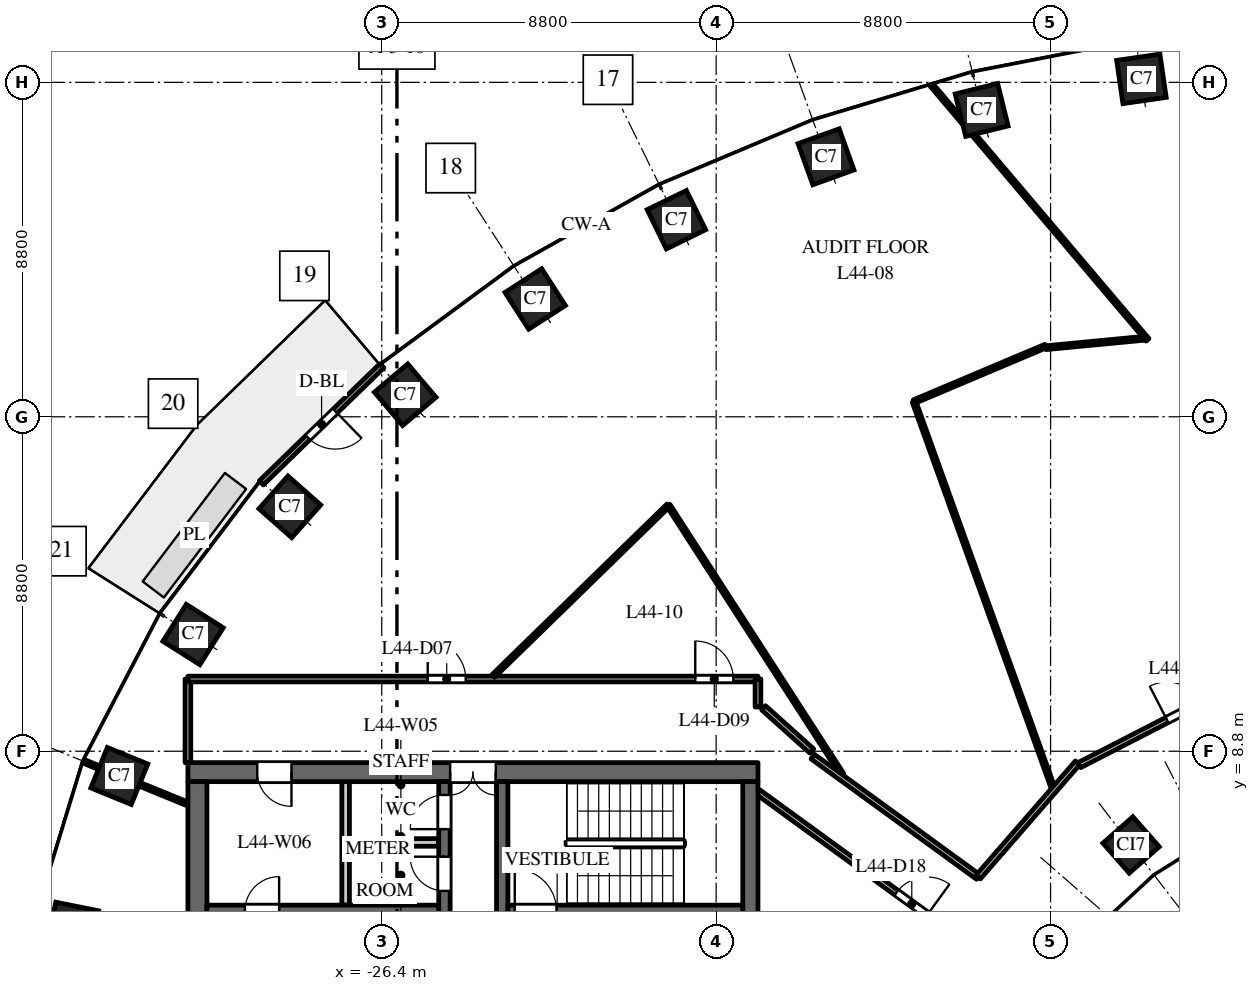
"""IFC4 building model, lengths in metres.
Left out: names, types, materials, properties, quantities, classifications, styles, units other than length and angle.
Written with IfcOpenShell. Run it as: python <this file> out.ifc"""

import sys

from ifc_helpers import new_model, si_unit, direction, frame, frame_2d, origin, origin_2d, place, context, subcontext, project, spatial, rectangle, extrude, element, fill, save


model = new_model("IFC4")
c1 = context("Model", 3, precision=1e-05, world=origin(), true_north=direction((0.0, 1.0)))
c2 = subcontext(c1, "Body", "Model", "MODEL_VIEW")
j1 = project(units=[si_unit("LENGTHUNIT", "METRE"), si_unit("PLANEANGLEUNIT", "RADIAN")], contexts=[c1])
p1 = place(None, origin())
s1 = spatial("IfcSite", under=j1, at=p1, CompositionType="ELEMENT")
p2 = place(p1, origin())
s2 = spatial("IfcBuilding", under=s1, at=p2, CompositionType="ELEMENT")
p3 = place(p2, frame((0.0, 0.0, 190.0)))
s3 = spatial("IfcBuildingStorey", under=s2, at=p3, CompositionType="ELEMENT", Elevation=190.0)
for number, where, z_axis, x_axis in (
    (1, (-6.409, 26.491, 0.0), (0.0, 0.0, 1.0), (-0.99, -0.143, 0.0)),
    (2, (-10.613, 25.674, 0.0), (0.0, 0.0, 1.0), (-0.971, -0.24, 0.0)),
    (3, (-14.709, 24.441, 0.0), (0.0, 0.0, 1.0), (-0.941, -0.338, 0.0)),
    (4, (-18.646, 22.785, 0.0), (0.0, 0.0, 1.0), (-0.898, -0.439, 0.0)),
    (5, (-22.362, 20.7, 0.0), (0.0, 0.0, 1.0), (-0.84, -0.542, 0.0)),
    (6, (-25.783, 18.18, 0.0), (0.0, 0.0, 1.0), (-0.763, -0.646, 0.0)),
    (7, (-28.819, 15.23, 0.0), (0.0, 0.0, 1.0), (-0.663, -0.749, 0.0)),
    (8, (-31.365, 11.871, 0.0), (0.0, 0.0, 1.0), (-0.535, -0.845, 0.0)),
    (9, (-33.305, 8.149, 0.0), (0.0, 0.0, 1.0), (-0.379, -0.925, 0.0)),
    (10, (-34.527, 4.151, 0.0), (0.0, 0.0, 1.0), (-0.197, -0.98, 0.0)),
):
    element("IfcColumn", number, at=place(p3, frame(where, z_axis=z_axis, x_axis=x_axis)), inside=s3, PredefinedType="COLUMN", context=c2, shape_type="SweptSolid", body=[
        extrude(rectangle(XDim=1.15, YDim=1.15, at=origin_2d()), origin(), (0.0, 0.0, 1.0), 4.0),
    ])
p4 = place(p3, frame((-6.682, 6.334, 0.0), z_axis=(0.0, 0.0, 1.0), x_axis=(-0.75102249095, -0.660276622399, 0.0)))
e11 = element("IfcColumn", 11, at=p4, inside=s3, PredefinedType="COLUMN", context=c2, shape_type="SweptSolid", body=[
    extrude(rectangle(XDim=1.05, YDim=1.05, at=origin_2d()), origin(), (0.0, 0.0, 1.0), 4.0),
])
p5 = place(p3, frame((-16.5, 8.25, 0.0), z_axis=(0.0, 0.0, 1.0), x_axis=(-1.0, 0.0, 0.0)))
e12 = element("IfcWall", 12, at=p5, inside=s3, PredefinedType="SHEAR", context=c2, shape_type="SweptSolid", body=[
    extrude(rectangle(XDim=15.0, YDim=0.5, at=frame_2d((7.5, 0.0))), origin(), (0.0, 0.0, 1.0), 3.7),
])
p6 = place(p5, frame((6.9, 0.0, 0.0)))
e13 = element("IfcOpeningElement", 13, at=p6, cuts=e12, PredefinedType="OPENING", context=c2, shape_type="SweptSolid", body=[
    extrude(rectangle(XDim=1.2, YDim=2.1, at=frame_2d((0.6, 1.05))), frame((0.0, 0.26, 0.0), z_axis=(0.0, -1.0, 0.0), x_axis=(1.0, 0.0, 0.0)), (0.0, 0.0, 1.0), 0.52),
])
p7 = place(p5, frame((12.275, 0.0, 0.0)))
e14 = element("IfcOpeningElement", 14, at=p7, cuts=e12, PredefinedType="OPENING", context=c2, shape_type="SweptSolid", body=[
    extrude(rectangle(XDim=0.9, YDim=2.1, at=frame_2d((0.45, 1.05))), frame((0.0, 0.26, 0.0), z_axis=(0.0, -1.0, 0.0), x_axis=(1.0, 0.0, 0.0)), (0.0, 0.0, 1.0), 0.52),
])
p8 = place(p3, frame((-24.75, -8.0, 0.0), z_axis=(0.0, 0.0, 1.0), x_axis=(0.0, 1.0, 0.0)))
e15 = element("IfcWall", 15, at=p8, inside=s3, PredefinedType="SHEAR", context=c2, shape_type="SweptSolid", body=[
    extrude(rectangle(XDim=16.0, YDim=0.3, at=frame_2d((8.0, 0.0))), origin(), (0.0, 0.0, 1.0), 3.7),
])
p9 = place(p8, frame((4.425, 0.0, 0.0)))
e16 = element("IfcOpeningElement", 16, at=p9, cuts=e15, PredefinedType="OPENING", context=c2, shape_type="SweptSolid", body=[
    extrude(rectangle(XDim=1.1, YDim=2.1, at=frame_2d((0.55, 1.05))), frame((0.0, 0.16, 0.0), z_axis=(0.0, -1.0, 0.0), x_axis=(1.0, 0.0, 0.0)), (0.0, 0.0, 1.0), 0.32),
])
p10 = place(p8, frame((7.45, 0.0, 0.0)))
e17 = element("IfcOpeningElement", 17, at=p10, cuts=e15, PredefinedType="OPENING", context=c2, shape_type="SweptSolid", body=[
    extrude(rectangle(XDim=1.1, YDim=2.1, at=frame_2d((0.55, 1.05))), frame((0.0, 0.16, 0.0), z_axis=(0.0, -1.0, 0.0), x_axis=(1.0, 0.0, 0.0)), (0.0, 0.0, 1.0), 0.32),
])
p11 = place(p8, frame((10.475, 0.0, 0.0)))
e18 = element("IfcOpeningElement", 18, at=p11, cuts=e15, PredefinedType="OPENING", context=c2, shape_type="SweptSolid", body=[
    extrude(rectangle(XDim=1.1, YDim=2.1, at=frame_2d((0.55, 1.05))), frame((0.0, 0.16, 0.0), z_axis=(0.0, -1.0, 0.0), x_axis=(1.0, 0.0, 0.0)), (0.0, 0.0, 1.0), 0.32),
])
p12 = place(p8, frame((13.125, 0.0, 0.0)))
e19 = element("IfcOpeningElement", 19, at=p12, cuts=e15, PredefinedType="OPENING", context=c2, shape_type="SweptSolid", body=[
    extrude(rectangle(XDim=0.9, YDim=2.1, at=frame_2d((0.45, 1.05))), frame((0.0, 0.16, 0.0), z_axis=(0.0, -1.0, 0.0), x_axis=(1.0, 0.0, 0.0)), (0.0, 0.0, 1.0), 0.32),
])
p13 = place(p8, frame((14.75, 0.0, 0.0)))
e20 = element("IfcOpeningElement", 20, at=p13, cuts=e15, PredefinedType="OPENING", context=c2, shape_type="SweptSolid", body=[
    extrude(rectangle(XDim=0.9, YDim=2.1, at=frame_2d((0.45, 1.05))), frame((0.0, 0.16, 0.0), z_axis=(0.0, -1.0, 0.0), x_axis=(1.0, 0.0, 0.0)), (0.0, 0.0, 1.0), 0.32),
])
p14 = place(p8, frame((1.35, 0.0, 0.0)))
e21 = element("IfcOpeningElement", 21, at=p14, cuts=e15, PredefinedType="OPENING", context=c2, shape_type="SweptSolid", body=[
    extrude(rectangle(XDim=0.9, YDim=2.1, at=frame_2d((0.45, 1.05))), frame((0.0, 0.16, 0.0), z_axis=(0.0, -1.0, 0.0), x_axis=(1.0, 0.0, 0.0)), (0.0, 0.0, 1.0), 0.32),
])
p15 = place(p3, frame((-16.7, -8.0, 0.0), z_axis=(0.0, 0.0, 1.0), x_axis=(0.0, 1.0, 0.0)))
e22 = element("IfcWall", 22, at=p15, inside=s3, PredefinedType="SHEAR", context=c2, shape_type="SweptSolid", body=[
    extrude(rectangle(XDim=16.0, YDim=0.4, at=frame_2d((8.0, 0.0))), origin(), (0.0, 0.0, 1.0), 3.7),
])
p16 = place(p3, frame((-31.25, -8.0, 0.0), z_axis=(0.0, 0.0, 1.0), x_axis=(0.0, 1.0, 0.0)))
e23 = element("IfcWall", 23, at=p16, inside=s3, PredefinedType="SHEAR", context=c2, shape_type="SweptSolid", body=[
    extrude(rectangle(XDim=16.0, YDim=0.5, at=frame_2d((8.0, 0.0))), origin(), (0.0, 0.0, 1.0), 3.7),
])
p17 = place(p3, frame((-24.9, 4.6, 0.0), z_axis=(0.0, 0.0, 1.0), x_axis=(-1.0, 0.0, 0.0)))
e24 = element("IfcWall", 24, at=p17, inside=s3, PredefinedType="SHEAR", context=c2, shape_type="SweptSolid", body=[
    extrude(rectangle(XDim=6.1, YDim=0.3, at=frame_2d((3.05, 0.0))), origin(), (0.0, 0.0, 1.0), 3.7),
])
p18 = place(p17, frame((4.2, 0.0, 0.0)))
e25 = element("IfcOpeningElement", 25, at=p18, cuts=e24, PredefinedType="OPENING", context=c2, shape_type="SweptSolid", body=[
    extrude(rectangle(XDim=0.9, YDim=2.1, at=frame_2d((0.45, 1.05))), frame((0.0, 0.16, 0.0), z_axis=(0.0, -1.0, 0.0), x_axis=(1.0, 0.0, 0.0)), (0.0, 0.0, 1.0), 0.32),
])
p19 = place(p3, frame((-27.35, 4.75, 0.0), z_axis=(0.0, 0.0, 1.0), x_axis=(0.0, 1.0, 0.0)))
e26 = element("IfcWall", 26, at=p19, inside=s3, PredefinedType="PARTITIONING", context=c2, shape_type="SweptSolid", body=[
    extrude(rectangle(XDim=3.25, YDim=0.2, at=frame_2d((1.625, 0.0))), origin(), (0.0, 0.0, 1.0), 3.7),
])
p20 = place(p3, frame((-24.9, 6.4, 0.0), z_axis=(0.0, 0.0, 1.0), x_axis=(-1.0, 0.0, 0.0)))
e27 = element("IfcWall", 27, at=p20, inside=s3, PredefinedType="PARTITIONING", context=c2, shape_type="SweptSolid", body=[
    extrude(rectangle(XDim=2.35, YDim=0.2, at=frame_2d((1.175, 0.0))), origin(), (0.0, 0.0, 1.0), 3.7),
])
p21 = place(p3, frame((-23.23, 2.25, 0.0), z_axis=(0.0, 0.0, 1.0), x_axis=(0.0, 1.0, 0.0)))
e28 = element("IfcWall", 28, at=p21, inside=s3, PredefinedType="SHEAR", context=c2, shape_type="SweptSolid", body=[
    extrude(rectangle(XDim=5.75, YDim=0.3, at=frame_2d((2.875, 0.0))), origin(), (0.0, 0.0, 1.0), 3.7),
])
p22 = place(p21, frame((0.6, 0.0, 0.0)))
e29 = element("IfcOpeningElement", 29, at=p22, cuts=e28, PredefinedType="OPENING", context=c2, shape_type="SweptSolid", body=[
    extrude(rectangle(XDim=1.0, YDim=2.1, at=frame_2d((0.5, 1.05))), frame((0.0, 0.16, 0.0), z_axis=(0.0, -1.0, 0.0), x_axis=(1.0, 0.0, 0.0)), (0.0, 0.0, 1.0), 0.32),
])
p23 = place(p3, frame((-16.9, 4.6, 0.0), z_axis=(0.0, 0.0, 1.0), x_axis=(-1.0, 0.0, 0.0)))
e30 = element("IfcWall", 30, at=p23, inside=s3, PredefinedType="SHEAR", context=c2, shape_type="SweptSolid", body=[
    extrude(rectangle(XDim=6.18, YDim=0.3, at=frame_2d((3.09, 0.0))), origin(), (0.0, 0.0, 1.0), 3.7),
])
p24 = place(p23, frame((4.9, 0.0, 0.0)))
e31 = element("IfcOpeningElement", 31, at=p24, cuts=e30, PredefinedType="OPENING", context=c2, shape_type="SweptSolid", body=[
    extrude(rectangle(XDim=1.1, YDim=2.1, at=frame_2d((0.55, 1.05))), frame((0.0, 0.16, 0.0), z_axis=(0.0, -1.0, 0.0), x_axis=(1.0, 0.0, 0.0)), (0.0, 0.0, 1.0), 0.32),
])
p25 = place(p3, frame((-26.396, 18.943, 0.0), z_axis=(0.0, 0.0, 1.0), x_axis=(-0.717214761864, -0.696852197647, 0.0)))
e32 = element("IfcWall", 32, at=p25, inside=s3, PredefinedType="STANDARD", context=c2, shape_type="SweptSolid", body=[
    extrude(rectangle(XDim=4.424, YDim=0.15, at=frame_2d((2.212, 0.0))), origin(), (0.0, 0.0, 1.0), 3.7),
])
p26 = place(p25, frame((1.712, 0.0, 0.0)))
e33 = element("IfcOpeningElement", 33, at=p26, cuts=e32, PredefinedType="OPENING", context=c2, shape_type="SweptSolid", body=[
    extrude(rectangle(XDim=1.0, YDim=2.4, at=frame_2d((0.5, 1.2))), frame((0.0, 0.085, 0.0), z_axis=(0.0, -1.0, 0.0), x_axis=(1.0, 0.0, 0.0)), (0.0, 0.0, 1.0), 0.17),
])
p27 = place(p3, frame((-34.234, 8.53, 0.0), z_axis=(0.0, 0.0, 1.0), x_axis=(0.925344112436, -0.379128307542, 0.0)))
e34 = element("IfcWall", 34, at=p27, inside=s3, PredefinedType="PARTITIONING", context=c2, shape_type="SweptSolid", body=[
    extrude(rectangle(XDim=2.954, YDim=0.1, at=frame_2d((1.477, 0.0))), origin(), (0.0, 0.0, 1.0), 2.9),
])
p28 = place(p3, frame((-31.5, 8.5, 0.0), z_axis=(0.0, 0.0, 1.0), x_axis=(0.0, 1.0, 0.0)))
e35 = element("IfcWall", 35, at=p28, inside=s3, PredefinedType="PARTITIONING", context=c2, shape_type="SweptSolid", body=[
    extrude(rectangle(XDim=2.2, YDim=0.15, at=frame_2d((1.1, 0.0))), origin(), (0.0, 0.0, 1.0), 3.7),
])
p29 = place(p3, frame((-31.5, 10.7, 0.0), z_axis=(0.0, 0.0, 1.0), x_axis=(1.0, 0.0, 0.0)))
e36 = element("IfcWall", 36, at=p29, inside=s3, PredefinedType="PARTITIONING", context=c2, shape_type="SweptSolid", body=[
    extrude(rectangle(XDim=15.0, YDim=0.15, at=frame_2d((7.5, 0.0))), origin(), (0.0, 0.0, 1.0), 3.1),
])
p30 = place(p29, frame((6.31, 0.0, 0.0)))
e37 = element("IfcOpeningElement", 37, at=p30, cuts=e36, PredefinedType="OPENING", context=c2, shape_type="SweptSolid", body=[
    extrude(rectangle(XDim=1.0, YDim=2.1, at=frame_2d((0.5, 1.05))), frame((0.0, 0.085, 0.0), z_axis=(0.0, -1.0, 0.0), x_axis=(1.0, 0.0, 0.0)), (0.0, 0.0, 1.0), 0.17),
])
p31 = place(p29, frame((13.35, 0.0, 0.0)))
e38 = element("IfcOpeningElement", 38, at=p31, cuts=e36, PredefinedType="OPENING", context=c2, shape_type="SweptSolid", body=[
    extrude(rectangle(XDim=1.0, YDim=2.1, at=frame_2d((0.5, 1.05))), frame((0.0, 0.085, 0.0), z_axis=(0.0, -1.0, 0.0), x_axis=(1.0, 0.0, 0.0)), (0.0, 0.0, 1.0), 0.17),
])
p32 = place(p3, frame((-23.466, 10.778, 0.0), z_axis=(0.0, 0.0, 1.0), x_axis=(0.716078357027, 0.698019904156, 0.0)))
e39 = element("IfcWall", 39, at=p32, inside=s3, PredefinedType="PARTITIONING", context=c2, shape_type="SweptSolid", body=[
    extrude(rectangle(XDim=6.435, YDim=0.1, at=frame_2d((3.218, 0.0))), origin(), (0.0, 0.0, 1.0), 2.75),
])
p33 = place(p3, frame((-18.858, 15.27, 0.0), z_axis=(0.0, 0.0, 1.0), x_axis=(0.542349920329, -0.840152702739, 0.0)))
e40 = element("IfcWall", 40, at=p33, inside=s3, PredefinedType="PARTITIONING", context=c2, shape_type="SweptSolid", body=[
    extrude(rectangle(XDim=8.426, YDim=0.1, at=frame_2d((4.213, 0.0))), origin(), (0.0, 0.0, 1.0), 2.75),
])
p34 = place(p3, frame((-16.5, 9.964, 0.0), z_axis=(0.0, 0.0, 1.0), x_axis=(0.0, 1.0, 0.0)))
e41 = element("IfcWall", 41, at=p34, inside=s3, PredefinedType="PARTITIONING", context=c2, shape_type="SweptSolid", body=[
    extrude(rectangle(XDim=0.736, YDim=0.15, at=frame_2d((0.368, 0.0))), origin(), (0.0, 0.0, 1.0), 3.7),
])
p35 = place(p3, frame((-16.5, 7.727, 0.0), z_axis=(0.0, 0.0, 1.0), x_axis=(0.808900994583, -0.587944879188, 0.0)))
e42 = element("IfcWall", 42, at=p35, inside=s3, PredefinedType="PARTITIONING", context=c2, shape_type="SweptSolid", body=[
    extrude(rectangle(XDim=6.273, YDim=0.15, at=frame_2d((3.136, 0.0))), origin(), (0.0, 0.0, 1.0), 3.7),
])
p36 = place(p35, frame((4.504, 0.0, 0.0)))
e43 = element("IfcOpeningElement", 43, at=p36, cuts=e42, PredefinedType="OPENING", context=c2, shape_type="SweptSolid", body=[
    extrude(rectangle(XDim=1.0, YDim=2.1, at=frame_2d((0.5, 1.05))), frame((0.0, 0.085, 0.0), z_axis=(0.0, -1.0, 0.0), x_axis=(1.0, 0.0, 0.0)), (0.0, 0.0, 1.0), 0.17),
])
p37 = place(p3, frame((-15.059, 8.658, 0.0), z_axis=(0.0, 0.0, 1.0), x_axis=(0.808838005268, -0.588031530816, 0.0)))
e44 = element("IfcWall", 44, at=p37, inside=s3, PredefinedType="PARTITIONING", context=c2, shape_type="SweptSolid", body=[
    extrude(rectangle(XDim=5.386, YDim=0.15, at=frame_2d((2.693, 0.0))), origin(), (0.0, 0.0, 1.0), 3.7),
])
p38 = place(p3, frame((-12.393, 17.999, 0.0), z_axis=(0.0, 0.0, 1.0), x_axis=(0.921243349635, 0.388986748816, 0.0)))
e45 = element("IfcWall", 45, at=p38, inside=s3, PredefinedType="PARTITIONING", context=c2, shape_type="SweptSolid", body=[
    extrude(rectangle(XDim=3.756, YDim=0.1, at=frame_2d((1.878, 0.0))), origin(), (0.0, 0.0, 1.0), 3.7),
])
p39 = place(p3, frame((-12.393, 17.999, 0.0), z_axis=(0.0, 0.0, 1.0), x_axis=(0.338550172492, -0.940948341146, 0.0)))
e46 = element("IfcWall", 46, at=p39, inside=s3, PredefinedType="PARTITIONING", context=c2, shape_type="SweptSolid", body=[
    extrude(rectangle(XDim=10.775, YDim=0.1, at=frame_2d((5.388, 0.0))), origin(), (0.0, 0.0, 1.0), 2.85),
])
p40 = place(p3, frame((-11.925, 26.323, 0.0), z_axis=(0.0, 0.0, 1.0), x_axis=(0.646450651597, -0.762955801505, 0.0)))
e47 = element("IfcWall", 47, at=p40, inside=s3, PredefinedType="PARTITIONING", context=c2, shape_type="SweptSolid", body=[
    extrude(rectangle(XDim=8.78, YDim=0.1, at=frame_2d((4.39, 0.0))), origin(), (0.0, 0.0, 1.0), 2.85),
])
p41 = place(p3, frame((-10.703, 5.491, 0.0), z_axis=(0.0, 0.0, 1.0), x_axis=(0.656266732873, 0.754528975802, 0.0)))
e48 = element("IfcWall", 48, at=p41, inside=s3, PredefinedType="PARTITIONING", context=c2, shape_type="SweptSolid", body=[
    extrude(rectangle(XDim=3.983, YDim=0.15, at=frame_2d((1.991, 0.0))), origin(), (0.0, 0.0, 1.0), 2.75),
])
p42 = place(p3, frame((-8.923, 19.418, 0.0), z_axis=(0.0, 0.0, 1.0), x_axis=(0.995460608392, 0.095174456346, 0.0)))
e49 = element("IfcWall", 49, at=p42, inside=s3, PredefinedType="PARTITIONING", context=c2, shape_type="SweptSolid", body=[
    extrude(rectangle(XDim=2.586, YDim=0.1, at=frame_2d((1.293, 0.0))), origin(), (0.0, 0.0, 1.0), 2.85),
])
p43 = place(p3, frame((-8.042, 8.435, 0.0), z_axis=(0.0, 0.0, 1.0), x_axis=(0.88929925529, 0.457325742268, 0.0)))
e50 = element("IfcWall", 50, at=p43, inside=s3, PredefinedType="PARTITIONING", context=c2, shape_type="SweptSolid", body=[
    extrude(rectangle(XDim=4.459, YDim=0.15, at=frame_2d((2.229, 0.0))), origin(), (0.0, 0.0, 1.0), 2.85),
])
p44 = place(p43, frame((2.594, 0.0, 0.0)))
e51 = element("IfcOpeningElement", 51, at=p44, cuts=e50, PredefinedType="OPENING", context=c2, shape_type="SweptSolid", body=[
    extrude(rectangle(XDim=1.0, YDim=2.1, at=frame_2d((0.5, 1.05))), frame((0.0, 0.085, 0.0), z_axis=(0.0, -1.0, 0.0), x_axis=(1.0, 0.0, 0.0)), (0.0, 0.0, 1.0), 0.17),
])
p45 = place(p3, frame((-16.352, 9.942, 0.0), z_axis=(0.0, 0.0, 1.0), x_axis=(0.744832366149, -0.667251636444, 0.0)))
e52 = element("IfcWall", 52, at=p45, inside=s3, PredefinedType="PARTITIONING", context=c2, shape_type="SweptSolid", body=[
    extrude(rectangle(XDim=1.702, YDim=0.15, at=frame_2d((0.851, 0.0))), origin(), (0.0, 0.0, 1.0), 3.7),
])
p46 = place(p24, origin())
e53 = element("IfcDoor", 53, at=p46, inside=s3, OperationType="SINGLE_SWING_RIGHT", PredefinedType="DOOR", context=c2, shape_type="SweptSolid", body=[
    extrude(rectangle(XDim=1.1, YDim=2.1, at=frame_2d((0.55, 1.05))), frame((0.0, 0.025, 0.0), z_axis=(0.0, -1.0, 0.0), x_axis=(1.0, 0.0, 0.0)), (0.0, 0.0, 1.0), 0.05),
])
fill(e31, e53)
p47 = place(p6, origin())
e54 = element("IfcDoor", 54, at=p47, inside=s3, OperationType="DOUBLE_DOOR_DOUBLE_SWING", PredefinedType="DOOR", context=c2, shape_type="SweptSolid", body=[
    extrude(rectangle(XDim=1.2, YDim=2.1, at=frame_2d((0.6, 1.05))), frame((0.0, 0.025, 0.0), z_axis=(0.0, -1.0, 0.0), x_axis=(1.0, 0.0, 0.0)), (0.0, 0.0, 1.0), 0.05),
])
fill(e13, e54)
p48 = place(p12, origin())
e55 = element("IfcDoor", 55, at=p48, inside=s3, OperationType="SINGLE_SWING_LEFT", PredefinedType="DOOR", context=c2, shape_type="SweptSolid", body=[
    extrude(rectangle(XDim=0.9, YDim=2.1, at=frame_2d((0.45, 1.05))), frame((0.0, 0.025, 0.0), z_axis=(0.0, -1.0, 0.0), x_axis=(1.0, 0.0, 0.0)), (0.0, 0.0, 1.0), 0.05),
])
fill(e19, e55)
p49 = place(p13, origin())
e56 = element("IfcDoor", 56, at=p49, inside=s3, OperationType="SINGLE_SWING_RIGHT", PredefinedType="DOOR", context=c2, shape_type="SweptSolid", body=[
    extrude(rectangle(XDim=0.9, YDim=2.1, at=frame_2d((0.45, 1.05))), frame((0.0, 0.025, 0.0), z_axis=(0.0, -1.0, 0.0), x_axis=(1.0, 0.0, 0.0)), (0.0, 0.0, 1.0), 0.05),
])
fill(e20, e56)
p50 = place(p7, origin())
e57 = element("IfcDoor", 57, at=p50, inside=s3, OperationType="SINGLE_SWING_RIGHT", PredefinedType="DOOR", context=c2, shape_type="SweptSolid", body=[
    extrude(rectangle(XDim=0.9, YDim=2.1, at=frame_2d((0.45, 1.05))), frame((0.0, 0.025, 0.0), z_axis=(0.0, -1.0, 0.0), x_axis=(1.0, 0.0, 0.0)), (0.0, 0.0, 1.0), 0.05),
])
fill(e14, e57)
p51 = place(p18, origin())
e58 = element("IfcDoor", 58, at=p51, inside=s3, OperationType="SINGLE_SWING_LEFT", PredefinedType="DOOR", context=c2, shape_type="SweptSolid", body=[
    extrude(rectangle(XDim=0.9, YDim=2.1, at=frame_2d((0.45, 1.05))), frame((0.0, 0.025, 0.0), z_axis=(0.0, -1.0, 0.0), x_axis=(1.0, 0.0, 0.0)), (0.0, 0.0, 1.0), 0.05),
])
fill(e25, e58)
p52 = place(p26, origin())
e59 = element("IfcDoor", 59, at=p52, inside=s3, OperationType="SINGLE_SWING_LEFT", PredefinedType="DOOR", context=c2, shape_type="SweptSolid", body=[
    extrude(rectangle(XDim=1.0, YDim=2.4, at=frame_2d((0.5, 1.2))), frame((0.0, 0.025, 0.0), z_axis=(0.0, -1.0, 0.0), x_axis=(1.0, 0.0, 0.0)), (0.0, 0.0, 1.0), 0.05),
])
fill(e33, e59)
p53 = place(p30, origin())
e60 = element("IfcDoor", 60, at=p53, inside=s3, OperationType="SINGLE_SWING_LEFT", PredefinedType="DOOR", context=c2, shape_type="SweptSolid", body=[
    extrude(rectangle(XDim=1.0, YDim=2.1, at=frame_2d((0.5, 1.05))), frame((0.0, 0.025, 0.0), z_axis=(0.0, -1.0, 0.0), x_axis=(1.0, 0.0, 0.0)), (0.0, 0.0, 1.0), 0.05),
])
fill(e37, e60)
p54 = place(p31, origin())
e61 = element("IfcDoor", 61, at=p54, inside=s3, OperationType="SINGLE_SWING_LEFT", PredefinedType="DOOR", context=c2, shape_type="SweptSolid", body=[
    extrude(rectangle(XDim=1.0, YDim=2.1, at=frame_2d((0.5, 1.05))), frame((0.0, 0.025, 0.0), z_axis=(0.0, -1.0, 0.0), x_axis=(1.0, 0.0, 0.0)), (0.0, 0.0, 1.0), 0.05),
])
fill(e38, e61)
p55 = place(p44, origin())
e62 = element("IfcDoor", 62, at=p55, inside=s3, OperationType="SINGLE_SWING_LEFT", PredefinedType="DOOR", context=c2, shape_type="SweptSolid", body=[
    extrude(rectangle(XDim=1.0, YDim=2.1, at=frame_2d((0.5, 1.05))), frame((0.0, 0.025, 0.0), z_axis=(0.0, -1.0, 0.0), x_axis=(1.0, 0.0, 0.0)), (0.0, 0.0, 1.0), 0.05),
])
fill(e51, e62)
p56 = place(p36, origin())
e63 = element("IfcDoor", 63, at=p56, inside=s3, OperationType="SINGLE_SWING_RIGHT", PredefinedType="DOOR", context=c2, shape_type="SweptSolid", body=[
    extrude(rectangle(XDim=1.0, YDim=2.1, at=frame_2d((0.5, 1.05))), frame((0.0, 0.025, 0.0), z_axis=(0.0, -1.0, 0.0), x_axis=(1.0, 0.0, 0.0)), (0.0, 0.0, 1.0), 0.05),
])
fill(e43, e63)
save(model, sys.argv[1])
